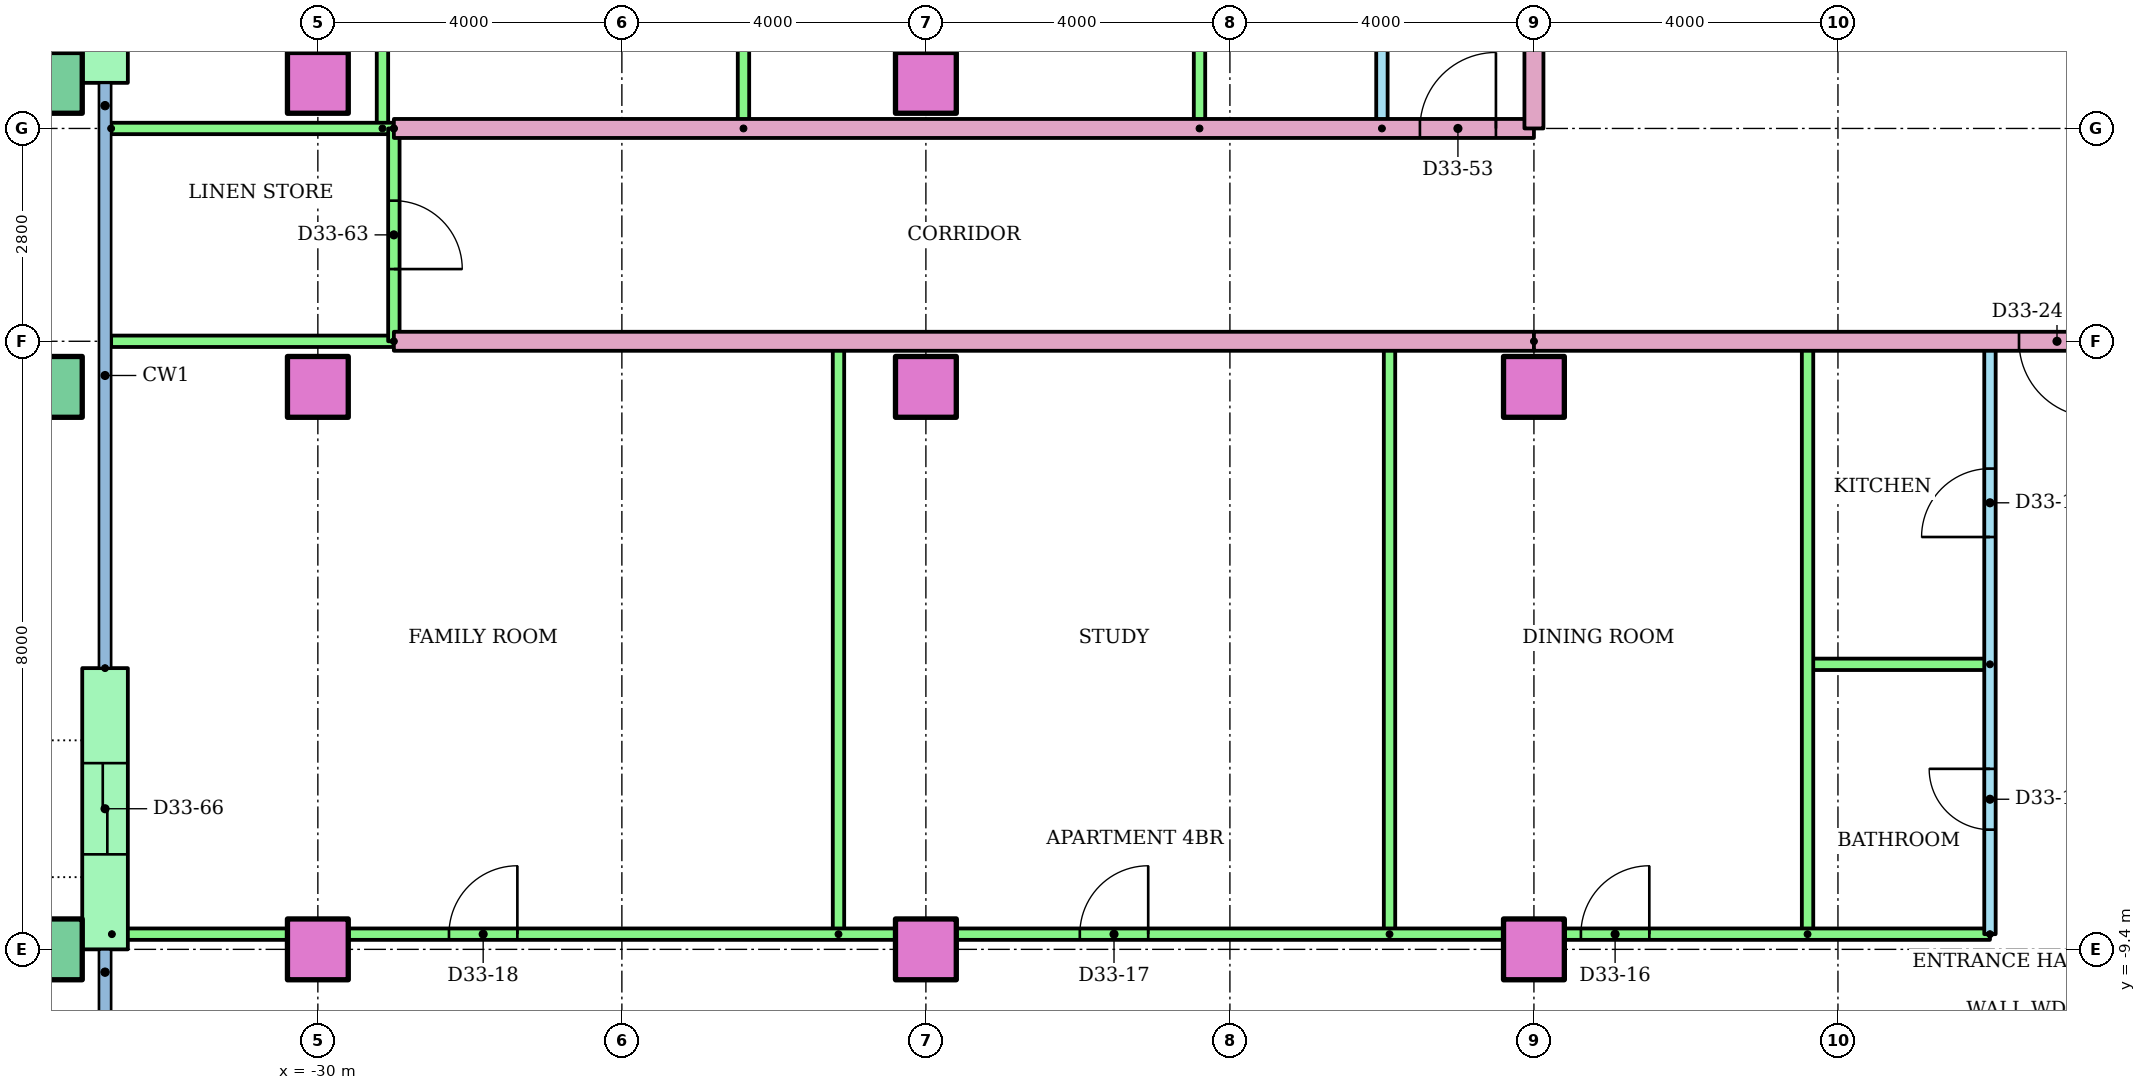
"""IFC4 building model, lengths in metres.
Left out: names, types, materials, properties, quantities, classifications, styles, units other than length and angle.
Written with IfcOpenShell. Run it as: python <this file> out.ifc"""

import sys

from ifc_helpers import new_model, si_unit, direction, frame, frame_2d, origin, origin_2d, place, context, subcontext, project, spatial, rectangle, hollow_rectangle, extrude, element, fill, save


model = new_model("IFC4")
c1 = context("Model", 3, precision=1e-05, world=origin(), true_north=direction((0.0, 1.0)))
c2 = subcontext(c1, "Body", "Model", "MODEL_VIEW")
j1 = project(units=[si_unit("LENGTHUNIT", "METRE"), si_unit("PLANEANGLEUNIT", "RADIAN")], contexts=[c1])
p1 = place(None, origin())
s1 = spatial("IfcSite", under=j1, at=p1, CompositionType="ELEMENT")
p2 = place(p1, origin())
s2 = spatial("IfcBuilding", under=s1, at=p2, CompositionType="ELEMENT")
p3 = place(p2, frame((0.0, 0.0, 129.4)))
s3 = spatial("IfcBuildingStorey", under=s2, at=p3, CompositionType="ELEMENT", Elevation=129.4)
p4 = place(p3, frame((-33.5, -9.4, 0.0)))
e1 = element("IfcColumn", 1, at=p4, inside=s3, PredefinedType="COLUMN", context=c2, shape_type="SweptSolid", body=[
    extrude(hollow_rectangle(XDim=0.8, YDim=0.8, WallThickness=0.04, at=origin_2d()), origin(), (0.0, 0.0, 1.0), 3.2),
])
for number, where in (
    (2, (-30.0, -9.4, 0.0)),
    (3, (-22.0, -9.4, 0.0)),
    (4, (-14.0, -9.4, 0.0)),
):
    element("IfcColumn", number, at=place(p3, frame(where)), inside=s3, PredefinedType="COLUMN", context=c2, shape_type="SweptSolid", body=[
        extrude(rectangle(XDim=0.8, YDim=0.8, at=origin_2d()), origin(), (0.0, 0.0, 1.0), 3.2),
    ])
p5 = place(p3, frame((-33.5, -2.0, 0.0)))
e5 = element("IfcColumn", 5, at=p5, inside=s3, PredefinedType="COLUMN", context=c2, shape_type="SweptSolid", body=[
    extrude(hollow_rectangle(XDim=0.8, YDim=0.8, WallThickness=0.04, at=origin_2d()), origin(), (0.0, 0.0, 1.0), 3.2),
])
for number, where in (
    (6, (-30.0, -2.0, 0.0)),
    (7, (-22.0, -2.0, 0.0)),
    (8, (-14.0, -2.0, 0.0)),
):
    element("IfcColumn", number, at=place(p3, frame(where)), inside=s3, PredefinedType="COLUMN", context=c2, shape_type="SweptSolid", body=[
        extrude(rectangle(XDim=0.8, YDim=0.8, at=origin_2d()), origin(), (0.0, 0.0, 1.0), 3.2),
    ])
p6 = place(p3, frame((-33.5, 2.0, 0.0)))
e9 = element("IfcColumn", 9, at=p6, inside=s3, PredefinedType="COLUMN", context=c2, shape_type="SweptSolid", body=[
    extrude(hollow_rectangle(XDim=0.8, YDim=0.8, WallThickness=0.04, at=origin_2d()), origin(), (0.0, 0.0, 1.0), 3.2),
])
for number, where in (
    (10, (-30.0, 2.0, 0.0)),
    (11, (-22.0, 2.0, 0.0)),
):
    element("IfcColumn", number, at=place(p3, frame(where)), inside=s3, PredefinedType="COLUMN", context=c2, shape_type="SweptSolid", body=[
        extrude(rectangle(XDim=0.8, YDim=0.8, at=origin_2d()), origin(), (0.0, 0.0, 1.0), 3.2),
    ])
p7 = place(p3, frame((-32.8, 6.5, 0.0), z_axis=(0.0, 0.0, 1.0), x_axis=(0.0, -1.0, 0.0)))
e12 = element("IfcWall", 12, at=p7, inside=s3, PredefinedType="STANDARD", context=c2, shape_type="SweptSolid", body=[
    extrude(rectangle(XDim=4.5, YDim=0.6, at=frame_2d((2.25, 0.0))), origin(), (0.0, 0.0, 1.0), 2.92),
])
p8 = place(p7, frame((1.65, 0.0, 0.0)))
e13 = element("IfcOpeningElement", 13, at=p8, cuts=e12, PredefinedType="OPENING", context=c2, shape_type="SweptSolid", body=[
    extrude(rectangle(XDim=1.2, YDim=2.1, at=frame_2d((0.6, 1.05))), frame((0.0, 0.31, 0.0), z_axis=(0.0, -1.0, 0.0), x_axis=(1.0, 0.0, 0.0)), (0.0, 0.0, 1.0), 0.62),
])
p9 = place(p3, frame((-32.8, -5.7, 0.0), z_axis=(0.0, 0.0, 1.0), x_axis=(0.0, -1.0, 0.0)))
e14 = element("IfcWall", 14, at=p9, inside=s3, PredefinedType="STANDARD", context=c2, shape_type="SweptSolid", body=[
    extrude(rectangle(XDim=3.7, YDim=0.6, at=frame_2d((1.85, 0.0))), origin(), (0.0, 0.0, 1.0), 2.92),
])
p10 = place(p9, frame((1.25, 0.0, 0.0)))
e15 = element("IfcOpeningElement", 15, at=p10, cuts=e14, PredefinedType="OPENING", context=c2, shape_type="SweptSolid", body=[
    extrude(rectangle(XDim=1.2, YDim=2.1, at=frame_2d((0.6, 1.05))), frame((0.0, 0.31, 0.0), z_axis=(0.0, -1.0, 0.0), x_axis=(1.0, 0.0, 0.0)), (0.0, 0.0, 1.0), 0.62),
])
p11 = place(p3, frame((-8.0, -9.2, 0.0), z_axis=(0.0, 0.0, 1.0), x_axis=(0.0, 1.0, 0.0)))
e16 = element("IfcWall", 16, at=p11, inside=s3, PredefinedType="PARTITIONING", context=c2, shape_type="SweptSolid", body=[
    extrude(rectangle(XDim=7.8, YDim=0.15, at=frame_2d((3.9, 0.0))), origin(), (0.0, 0.0, 1.0), 2.4),
])
p12 = place(p11, frame((5.225, 0.0, 0.0)))
e17 = element("IfcOpeningElement", 17, at=p12, cuts=e16, PredefinedType="OPENING", context=c2, shape_type="SweptSolid", body=[
    extrude(rectangle(XDim=0.9, YDim=2.1, at=frame_2d((0.45, 1.05))), frame((0.0, 0.085, 0.0), z_axis=(0.0, -1.0, 0.0), x_axis=(1.0, 0.0, 0.0)), (0.0, 0.0, 1.0), 0.17),
])
p13 = place(p11, frame((1.375, 0.0, 0.0)))
e18 = element("IfcOpeningElement", 18, at=p13, cuts=e16, PredefinedType="OPENING", context=c2, shape_type="SweptSolid", body=[
    extrude(rectangle(XDim=0.8, YDim=2.1, at=frame_2d((0.4, 1.05))), frame((0.0, 0.085, 0.0), z_axis=(0.0, -1.0, 0.0), x_axis=(1.0, 0.0, 0.0)), (0.0, 0.0, 1.0), 0.17),
])
p14 = place(p3, frame((-8.0, -5.65, 0.0), z_axis=(0.0, 0.0, 1.0), x_axis=(-1.0, 0.0, 0.0)))
e19 = element("IfcWall", 19, at=p14, inside=s3, PredefinedType="PARTITIONING", context=c2, shape_type="SweptSolid", body=[
    extrude(rectangle(XDim=2.4, YDim=0.15, at=frame_2d((1.2, 0.0))), origin(), (0.0, 0.0, 1.0), 2.4),
])
for number, where, z_axis, x_axis in (
    (20, (-10.4, -9.2, 0.0), (0.0, 0.0, 1.0), (0.0, 1.0, 0.0)),
    (21, (-15.9, -9.2, 0.0), (0.0, 0.0, 1.0), (0.0, 1.0, 0.0)),
    (22, (-23.15, -9.2, 0.0), (0.0, 0.0, 1.0), (0.0, 1.0, 0.0)),
):
    element("IfcWall", number, at=place(p3, frame(where, z_axis=z_axis, x_axis=x_axis)), inside=s3, PredefinedType="PARTITIONING", context=c2, shape_type="SweptSolid", body=[
        extrude(rectangle(XDim=7.8, YDim=0.15, at=frame_2d((3.9, 0.0))), origin(), (0.0, 0.0, 1.0), 2.4),
    ])
p15 = place(p3, frame((-32.71, -9.2, 0.0)))
e23 = element("IfcWall", 23, at=p15, inside=s3, PredefinedType="PARTITIONING", context=c2, shape_type="SweptSolid", body=[
    extrude(rectangle(XDim=24.71, YDim=0.15, at=frame_2d((12.355, 0.0))), origin(), (0.0, 0.0, 1.0), 2.4),
])
p16 = place(p15, frame((19.328, 0.0, 0.0)))
e24 = element("IfcOpeningElement", 24, at=p16, cuts=e23, PredefinedType="OPENING", context=c2, shape_type="SweptSolid", body=[
    extrude(rectangle(XDim=0.9, YDim=2.1, at=frame_2d((0.45, 1.05))), frame((0.0, 0.085, 0.0), z_axis=(0.0, -1.0, 0.0), x_axis=(1.0, 0.0, 0.0)), (0.0, 0.0, 1.0), 0.17),
])
p17 = place(p15, frame((12.735, 0.0, 0.0)))
e25 = element("IfcOpeningElement", 25, at=p17, cuts=e23, PredefinedType="OPENING", context=c2, shape_type="SweptSolid", body=[
    extrude(rectangle(XDim=0.9, YDim=2.1, at=frame_2d((0.45, 1.05))), frame((0.0, 0.085, 0.0), z_axis=(0.0, -1.0, 0.0), x_axis=(1.0, 0.0, 0.0)), (0.0, 0.0, 1.0), 0.17),
])
p18 = place(p15, frame((4.435, 0.0, 0.0)))
e26 = element("IfcOpeningElement", 26, at=p18, cuts=e23, PredefinedType="OPENING", context=c2, shape_type="SweptSolid", body=[
    extrude(rectangle(XDim=0.9, YDim=2.1, at=frame_2d((0.45, 1.05))), frame((0.0, 0.085, 0.0), z_axis=(0.0, -1.0, 0.0), x_axis=(1.0, 0.0, 0.0)), (0.0, 0.0, 1.0), 0.17),
])
p19 = place(p3, frame((-14.0, -1.4, 0.0), z_axis=(0.0, 0.0, 1.0), x_axis=(-1.0, 0.0, 0.0)))
e27 = element("IfcWall", 27, at=p19, inside=s3, PredefinedType="PARTITIONING", context=c2, shape_type="SweptSolid", body=[
    extrude(rectangle(XDim=15.0, YDim=0.25, at=frame_2d((7.5, 0.0))), origin(), (0.0, 0.0, 1.0), 2.4),
])
p20 = place(p3, frame((-29.0, -1.4, 0.0), z_axis=(0.0, 0.0, 1.0), x_axis=(-1.0, 0.0, 0.0)))
e28 = element("IfcWall", 28, at=p20, inside=s3, PredefinedType="PARTITIONING", context=c2, shape_type="SweptSolid", body=[
    extrude(rectangle(XDim=3.72, YDim=0.15, at=frame_2d((1.86, 0.0))), origin(), (0.0, 0.0, 1.0), 2.4),
])
p21 = place(p3, frame((-16.0, 1.4, 0.0), z_axis=(0.0, 0.0, 1.0), x_axis=(0.0, 1.0, 0.0)))
e29 = element("IfcWall", 29, at=p21, inside=s3, PredefinedType="PARTITIONING", context=c2, shape_type="SweptSolid", body=[
    extrude(rectangle(XDim=10.2, YDim=0.15, at=frame_2d((5.1, 0.0))), origin(), (0.0, 0.0, 1.0), 2.4),
])
p22 = place(p21, frame((2.3, 0.0, 0.0)))
e30 = element("IfcOpeningElement", 30, at=p22, cuts=e29, PredefinedType="OPENING", context=c2, shape_type="SweptSolid", body=[
    extrude(rectangle(XDim=0.9, YDim=2.1, at=frame_2d((0.45, 1.05))), frame((0.0, 0.085, 0.0), z_axis=(0.0, -1.0, 0.0), x_axis=(1.0, 0.0, 0.0)), (0.0, 0.0, 1.0), 0.17),
])
p23 = place(p21, frame((7.45, 0.0, 0.0)))
e31 = element("IfcOpeningElement", 31, at=p23, cuts=e29, PredefinedType="OPENING", context=c2, shape_type="SweptSolid", body=[
    extrude(rectangle(XDim=0.8, YDim=2.1, at=frame_2d((0.4, 1.05))), frame((0.0, 0.085, 0.0), z_axis=(0.0, -1.0, 0.0), x_axis=(1.0, 0.0, 0.0)), (0.0, 0.0, 1.0), 0.17),
])
for number, where, z_axis, x_axis in (
    (32, (-18.4, 1.4, 0.0), (0.0, 0.0, 1.0), (0.0, 1.0, 0.0)),
    (33, (-24.4, 1.4, 0.0), (0.0, 0.0, 1.0), (0.0, 1.0, 0.0)),
    (34, (-29.15, 1.4, 0.0), (0.0, 0.0, 1.0), (0.0, 1.0, 0.0)),
):
    element("IfcWall", number, at=place(p3, frame(where, z_axis=z_axis, x_axis=x_axis)), inside=s3, PredefinedType="PARTITIONING", context=c2, shape_type="SweptSolid", body=[
        extrude(rectangle(XDim=10.2, YDim=0.15, at=frame_2d((5.1, 0.0))), origin(), (0.0, 0.0, 1.0), 2.4),
    ])
p24 = place(p3, frame((-29.0, 1.4, 0.0)))
e35 = element("IfcWall", 35, at=p24, inside=s3, PredefinedType="PARTITIONING", context=c2, shape_type="SweptSolid", body=[
    extrude(rectangle(XDim=15.0, YDim=0.25, at=frame_2d((7.5, 0.0))), origin(), (0.0, 0.0, 1.0), 2.4),
])
p25 = place(p24, frame((13.5, 0.0, 0.0)))
e36 = element("IfcOpeningElement", 36, at=p25, cuts=e35, PredefinedType="OPENING", context=c2, shape_type="SweptSolid", body=[
    extrude(rectangle(XDim=1.0, YDim=2.1, at=frame_2d((0.5, 1.05))), frame((0.0, 0.135, 0.0), z_axis=(0.0, -1.0, 0.0), x_axis=(1.0, 0.0, 0.0)), (0.0, 0.0, 1.0), 0.27),
])
p26 = place(p3, frame((-32.72, 1.4, 0.0)))
e37 = element("IfcWall", 37, at=p26, inside=s3, PredefinedType="PARTITIONING", context=c2, shape_type="SweptSolid", body=[
    extrude(rectangle(XDim=3.72, YDim=0.15, at=frame_2d((1.86, 0.0))), origin(), (0.0, 0.0, 1.0), 2.4),
])
p27 = place(p3, frame((-29.0, 1.4, 0.0), z_axis=(0.0, 0.0, 1.0), x_axis=(0.0, -1.0, 0.0)))
e38 = element("IfcWall", 38, at=p27, inside=s3, PredefinedType="PARTITIONING", context=c2, shape_type="SweptSolid", body=[
    extrude(rectangle(XDim=2.8, YDim=0.15, at=frame_2d((1.4, 0.0))), origin(), (0.0, 0.0, 1.0), 2.4),
])
p28 = place(p27, frame((0.95, 0.0, 0.0)))
e39 = element("IfcOpeningElement", 39, at=p28, cuts=e38, PredefinedType="OPENING", context=c2, shape_type="SweptSolid", body=[
    extrude(rectangle(XDim=0.9, YDim=2.1, at=frame_2d((0.45, 1.05))), frame((0.0, 0.085, 0.0), z_axis=(0.0, -1.0, 0.0), x_axis=(1.0, 0.0, 0.0)), (0.0, 0.0, 1.0), 0.17),
])
p29 = place(p3, frame((14.0, -1.4, 0.0), z_axis=(0.0, 0.0, 1.0), x_axis=(-1.0, 0.0, 0.0)))
e40 = element("IfcWall", 40, at=p29, inside=s3, PredefinedType="PARTITIONING", context=c2, shape_type="SweptSolid", body=[
    extrude(rectangle(XDim=28.0, YDim=0.25, at=frame_2d((14.0, 0.0))), origin(), (0.0, 0.0, 1.0), 2.4),
])
p30 = place(p29, frame((20.618, 0.0, 0.0)))
e41 = element("IfcOpeningElement", 41, at=p30, cuts=e40, PredefinedType="OPENING", context=c2, shape_type="SweptSolid", body=[
    extrude(rectangle(XDim=1.0, YDim=2.1, at=frame_2d((0.5, 1.05))), frame((0.0, 0.135, 0.0), z_axis=(0.0, -1.0, 0.0), x_axis=(1.0, 0.0, 0.0)), (0.0, 0.0, 1.0), 0.27),
])
p31 = place(p29, frame((18.382, 0.0, 0.0)))
e42 = element("IfcOpeningElement", 42, at=p31, cuts=e40, PredefinedType="OPENING", context=c2, shape_type="SweptSolid", body=[
    extrude(rectangle(XDim=1.0, YDim=2.1, at=frame_2d((0.5, 1.05))), frame((0.0, 0.135, 0.0), z_axis=(0.0, -1.0, 0.0), x_axis=(1.0, 0.0, 0.0)), (0.0, 0.0, 1.0), 0.27),
])
p32 = place(p29, frame((2.382, 0.0, 0.0)))
e43 = element("IfcOpeningElement", 43, at=p32, cuts=e40, PredefinedType="OPENING", context=c2, shape_type="SweptSolid", body=[
    extrude(rectangle(XDim=1.0, YDim=2.1, at=frame_2d((0.5, 1.05))), frame((0.0, 0.135, 0.0), z_axis=(0.0, -1.0, 0.0), x_axis=(1.0, 0.0, 0.0)), (0.0, 0.0, 1.0), 0.27),
])
p33 = place(p3, frame((-14.0, 3.0, 0.0), z_axis=(0.0, 0.0, 1.0), x_axis=(0.0, -1.0, 0.0)))
e44 = element("IfcWall", 44, at=p33, inside=s3, PredefinedType="PARTITIONING", context=c2, shape_type="SweptSolid", body=[
    extrude(rectangle(XDim=1.6, YDim=0.25, at=frame_2d((0.8, 0.0))), origin(), (0.0, 0.0, 1.0), 2.4),
])
p34 = place(p12, origin())
e45 = element("IfcDoor", 45, at=p34, inside=s3, OperationType="SINGLE_SWING_LEFT", PredefinedType="DOOR", context=c2, shape_type="SweptSolid", body=[
    extrude(rectangle(XDim=0.9, YDim=2.1, at=frame_2d((0.45, 1.05))), frame((0.0, 0.025, 0.0), z_axis=(0.0, -1.0, 0.0), x_axis=(1.0, 0.0, 0.0)), (0.0, 0.0, 1.0), 0.05),
])
fill(e17, e45)
p35 = place(p13, origin())
e46 = element("IfcDoor", 46, at=p35, inside=s3, OperationType="SINGLE_SWING_RIGHT", PredefinedType="DOOR", context=c2, shape_type="SweptSolid", body=[
    extrude(rectangle(XDim=0.8, YDim=2.1, at=frame_2d((0.4, 1.05))), frame((0.0, 0.025, 0.0), z_axis=(0.0, -1.0, 0.0), x_axis=(1.0, 0.0, 0.0)), (0.0, 0.0, 1.0), 0.05),
])
fill(e18, e46)
p36 = place(p16, origin())
e47 = element("IfcDoor", 47, at=p36, inside=s3, OperationType="SINGLE_SWING_RIGHT", PredefinedType="DOOR", context=c2, shape_type="SweptSolid", body=[
    extrude(rectangle(XDim=0.9, YDim=2.1, at=frame_2d((0.45, 1.05))), frame((0.0, 0.025, 0.0), z_axis=(0.0, -1.0, 0.0), x_axis=(1.0, 0.0, 0.0)), (0.0, 0.0, 1.0), 0.05),
])
fill(e24, e47)
p37 = place(p17, origin())
e48 = element("IfcDoor", 48, at=p37, inside=s3, OperationType="SINGLE_SWING_RIGHT", PredefinedType="DOOR", context=c2, shape_type="SweptSolid", body=[
    extrude(rectangle(XDim=0.9, YDim=2.1, at=frame_2d((0.45, 1.05))), frame((0.0, 0.025, 0.0), z_axis=(0.0, -1.0, 0.0), x_axis=(1.0, 0.0, 0.0)), (0.0, 0.0, 1.0), 0.05),
])
fill(e25, e48)
p38 = place(p18, origin())
e49 = element("IfcDoor", 49, at=p38, inside=s3, OperationType="SINGLE_SWING_RIGHT", PredefinedType="DOOR", context=c2, shape_type="SweptSolid", body=[
    extrude(rectangle(XDim=0.9, YDim=2.1, at=frame_2d((0.45, 1.05))), frame((0.0, 0.025, 0.0), z_axis=(0.0, -1.0, 0.0), x_axis=(1.0, 0.0, 0.0)), (0.0, 0.0, 1.0), 0.05),
])
fill(e26, e49)
p39 = place(p30, origin())
e50 = element("IfcDoor", 50, at=p39, inside=s3, OperationType="SINGLE_SWING_LEFT", PredefinedType="DOOR", context=c2, shape_type="SweptSolid", body=[
    extrude(rectangle(XDim=1.0, YDim=2.1, at=frame_2d((0.5, 1.05))), frame((0.0, 0.025, 0.0), z_axis=(0.0, -1.0, 0.0), x_axis=(1.0, 0.0, 0.0)), (0.0, 0.0, 1.0), 0.05),
])
fill(e41, e50)
p40 = place(p25, origin())
e51 = element("IfcDoor", 51, at=p40, inside=s3, OperationType="SINGLE_SWING_RIGHT", PredefinedType="DOOR", context=c2, shape_type="SweptSolid", body=[
    extrude(rectangle(XDim=1.0, YDim=2.1, at=frame_2d((0.5, 1.05))), frame((0.0, 0.025, 0.0), z_axis=(0.0, -1.0, 0.0), x_axis=(1.0, 0.0, 0.0)), (0.0, 0.0, 1.0), 0.05),
])
fill(e36, e51)
p41 = place(p28, origin())
e52 = element("IfcDoor", 52, at=p41, inside=s3, OperationType="SINGLE_SWING_RIGHT", PredefinedType="DOOR", context=c2, shape_type="SweptSolid", body=[
    extrude(rectangle(XDim=0.9, YDim=2.1, at=frame_2d((0.45, 1.05))), frame((0.0, 0.025, 0.0), z_axis=(0.0, -1.0, 0.0), x_axis=(1.0, 0.0, 0.0)), (0.0, 0.0, 1.0), 0.05),
])
fill(e39, e52)
p42 = place(p10, origin())
e53 = element("IfcDoor", 53, at=p42, inside=s3, OperationType="SLIDING_TO_LEFT", PredefinedType="DOOR", context=c2, shape_type="SweptSolid", body=[
    extrude(rectangle(XDim=1.2, YDim=2.1, at=frame_2d((0.6, 1.05))), frame((0.0, 0.025, 0.0), z_axis=(0.0, -1.0, 0.0), x_axis=(1.0, 0.0, 0.0)), (0.0, 0.0, 1.0), 0.05),
])
fill(e15, e53)
save(model, sys.argv[1])
